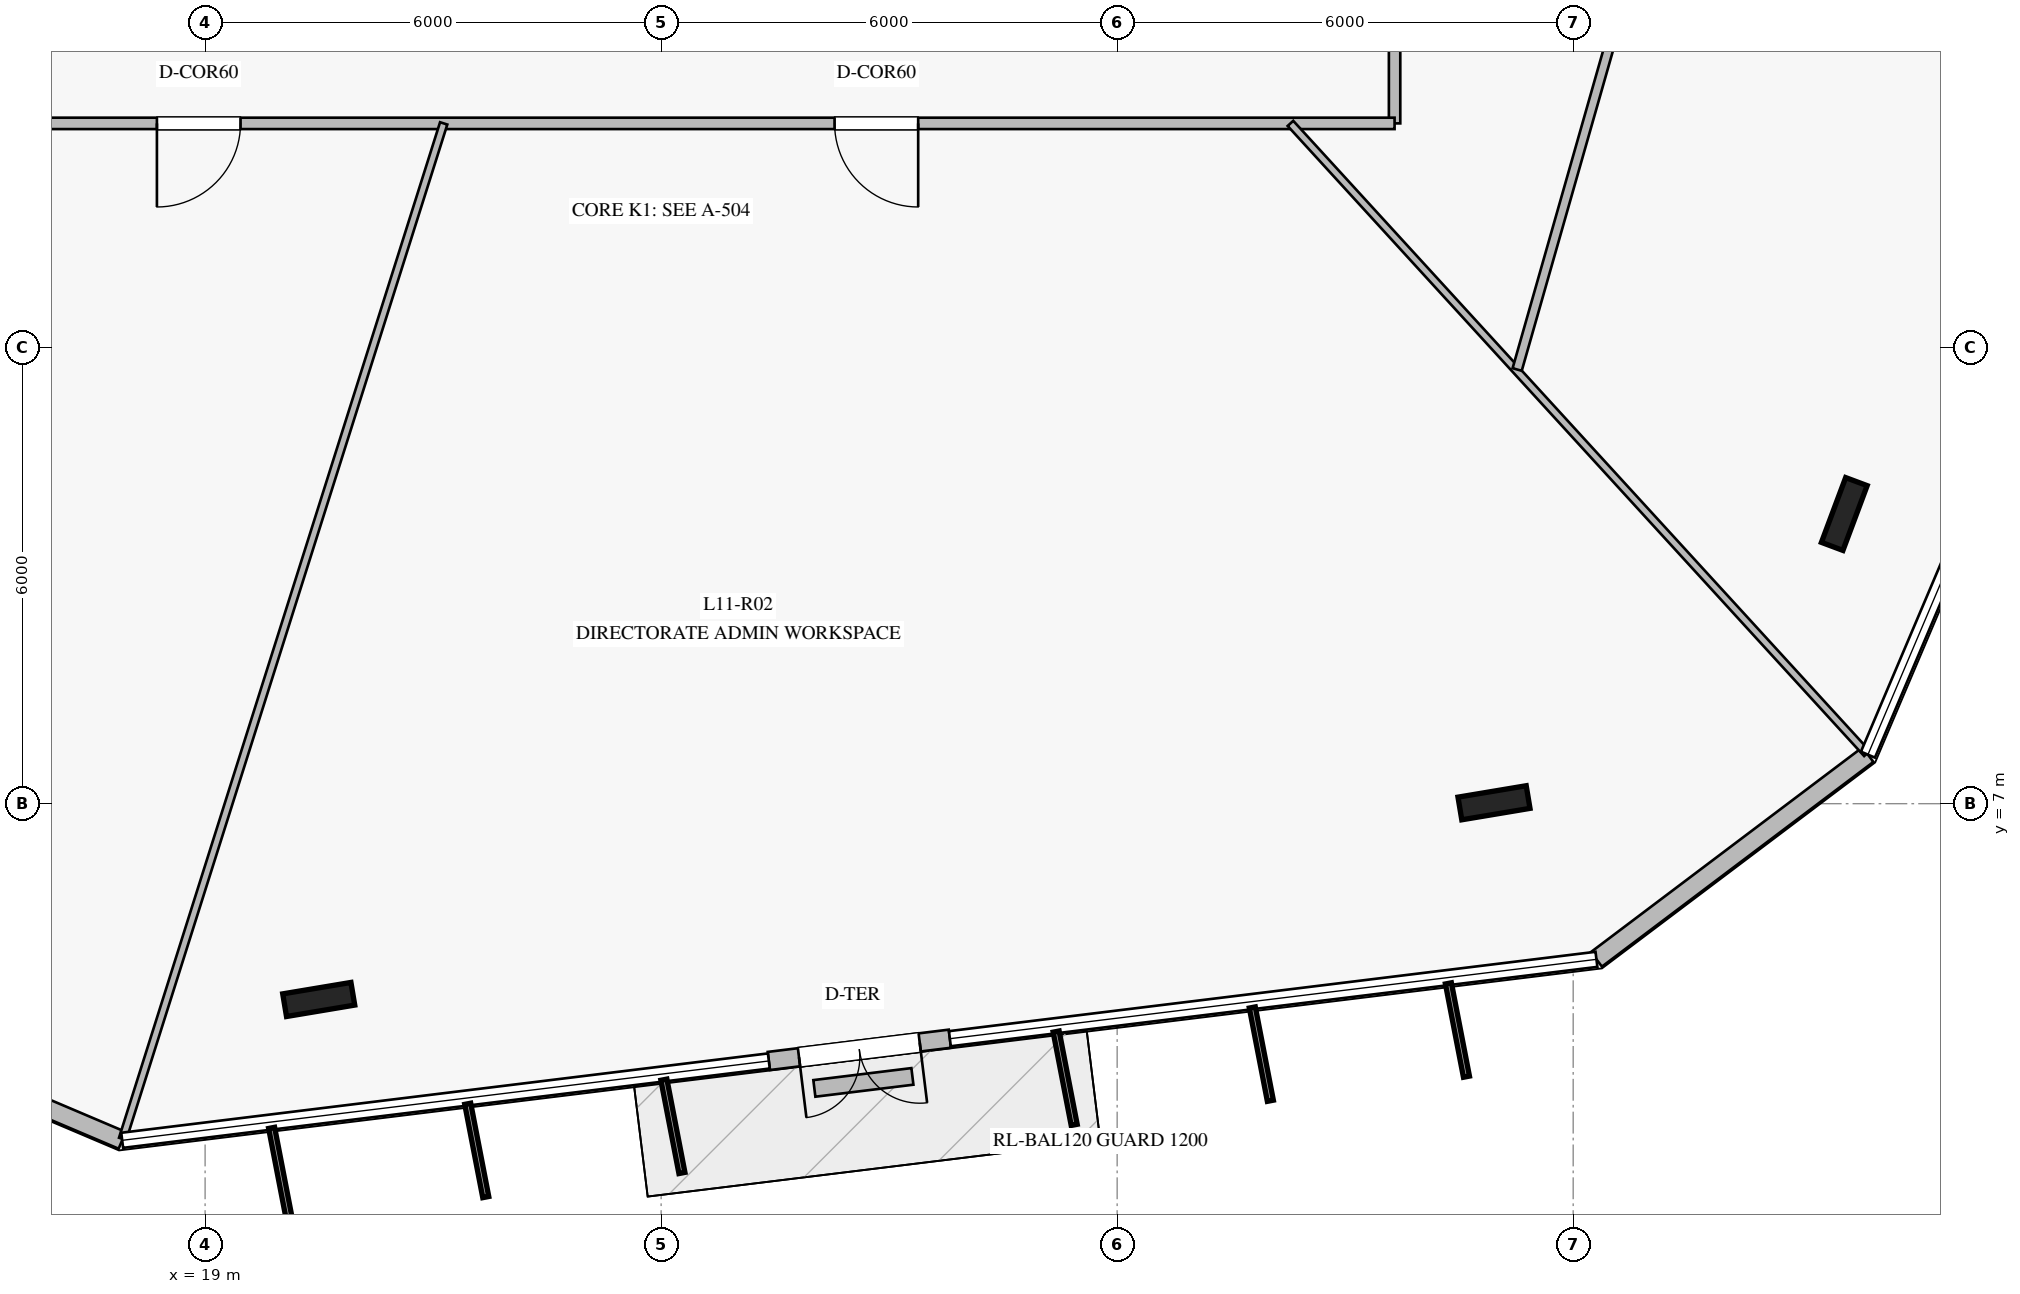
"""IFC4 building model, lengths in metres.
Left out: names, types, materials, properties, quantities, classifications, styles, units other than length and angle.
Written with IfcOpenShell. Run it as: python <this file> out.ifc"""

import sys

from ifc_helpers import new_model, si_unit, direction, frame, frame_2d, origin, origin_2d, place, context, subcontext, project, spatial, rectangle, i_section, extrude, element, fill, save


model = new_model("IFC4")
c1 = context("Model", 3, precision=1e-05, world=origin(), true_north=direction((0.0, 1.0)))
c2 = subcontext(c1, "Body", "Model", "MODEL_VIEW")
j1 = project(units=[si_unit("LENGTHUNIT", "METRE"), si_unit("PLANEANGLEUNIT", "RADIAN")], contexts=[c1])
p1 = place(None, origin())
s1 = spatial("IfcSite", under=j1, at=p1, CompositionType="ELEMENT")
p2 = place(p1, origin())
s2 = spatial("IfcBuilding", under=s1, at=p2, CompositionType="ELEMENT")
p3 = place(p2, frame((0.0, 0.0, 48.0)))
s3 = spatial("IfcBuildingStorey", under=s2, at=p3, CompositionType="ELEMENT", Elevation=48.0)
for number, where, z_axis, x_axis in (
    (1, (20.495, 4.424, 0.0), (0.0, 0.0, 1.0), (0.986, 0.165, 0.0)),
    (2, (35.958, 7.012, 0.0), (0.0, 0.0, 1.0), (0.986, 0.165, 0.0)),
    (3, (40.567, 10.811, 0.0), (0.0, 0.0, 1.0), (0.35, 0.937, 0.0)),
):
    element("IfcColumn", number, at=place(p3, frame(where, z_axis=z_axis, x_axis=x_axis)), inside=s3, PredefinedType="COLUMN", context=c2, shape_type="SweptSolid", body=[
        extrude(i_section(OverallWidth=0.302, OverallDepth=0.91, WebThickness=0.021, FlangeThickness=0.04, at=origin_2d()), origin(), (0.0, 0.0, 1.0), 4.0),
    ])
p4 = place(p3, frame((13.792, 4.319, 0.0), z_axis=(0.0, 0.0, 1.0), x_axis=(0.920463989724, -0.390827383409, 0.0)))
e4 = element("IfcWall", 4, at=p4, inside=s3, PredefinedType="STANDARD", context=c2, shape_type="SweptSolid", body=[
    extrude(rectangle(XDim=4.473, YDim=0.24, at=frame_2d((2.236, 0.0))), origin(), (0.0, 0.0, 1.0), 3.76),
])
p5 = place(p3, frame((26.417, 3.615, 0.0), z_axis=(0.0, 0.0, 1.0), x_axis=(0.992521632568, 0.122068869435, 0.0)))
e5 = element("IfcWall", 5, at=p5, inside=s3, PredefinedType="STANDARD", context=c2, shape_type="SweptSolid", body=[
    extrude(rectangle(XDim=2.4, YDim=0.24, at=frame_2d((1.2, 0.0))), origin(), (0.0, 0.0, 1.0), 3.76),
])
p6 = place(p5, frame((0.4, 0.0, 0.0)))
e6 = element("IfcOpeningElement", 6, at=p6, cuts=e5, PredefinedType="OPENING", context=c2, shape_type="SweptSolid", body=[
    extrude(rectangle(XDim=1.6, YDim=2.25, at=frame_2d((0.8, 1.125))), frame((0.0, 0.13, 0.0), z_axis=(0.0, -1.0, 0.0), x_axis=(1.0, 0.0, 0.0)), (0.0, 0.0, 1.0), 0.26),
])
p7 = place(p3, frame((37.306, 4.952, 0.0), z_axis=(0.0, 0.0, 1.0), x_axis=(0.798484642233, 0.602015179309, 0.0)))
e7 = element("IfcWall", 7, at=p7, inside=s3, PredefinedType="STANDARD", context=c2, shape_type="SweptSolid", body=[
    extrude(rectangle(XDim=4.473, YDim=0.24, at=frame_2d((2.237, 0.0))), origin(), (0.0, 0.0, 1.0), 3.76),
])
p8 = place(p3, frame((27.016, 3.254, 0.0), z_axis=(0.0, 0.0, 1.0), x_axis=(0.99256138924, 0.121745178919, 0.0)))
e8 = element("IfcWall", 8, at=p8, inside=s3, PredefinedType="USERDEFINED", context=c2, shape_type="SweptSolid", body=[
    extrude(rectangle(XDim=1.3, YDim=0.22, at=frame_2d((0.65, 0.0))), origin(), (0.0, 0.0, 1.0), 0.4),
])
p9 = place(p3, frame((34.65, 34.05, 0.0), z_axis=(0.0, 0.0, 1.0), x_axis=(0.0, -1.0, 0.0)))
e9 = element("IfcWall", 9, at=p9, inside=s3, PredefinedType="PARTITIONING", context=c2, shape_type="SweptSolid", body=[
    extrude(rectangle(XDim=18.1, YDim=0.15, at=frame_2d((9.05, 0.0))), origin(), (0.0, 0.0, 1.0), 3.21),
])
p10 = place(p9, frame((12.71, 0.0, 0.0)))
e10 = element("IfcOpeningElement", 10, at=p10, cuts=e9, PredefinedType="OPENING", context=c2, shape_type="SweptSolid", body=[
    extrude(rectangle(XDim=1.1, YDim=2.2, at=frame_2d((0.55, 1.1))), frame((0.0, 0.085, 0.0), z_axis=(0.0, -1.0, 0.0), x_axis=(1.0, 0.0, 0.0)), (0.0, 0.0, 1.0), 0.17),
])
p11 = place(p9, frame((4.117, 0.0, 0.0)))
e11 = element("IfcOpeningElement", 11, at=p11, cuts=e9, PredefinedType="OPENING", context=c2, shape_type="SweptSolid", body=[
    extrude(rectangle(XDim=1.1, YDim=2.2, at=frame_2d((0.55, 1.1))), frame((0.0, 0.085, 0.0), z_axis=(0.0, -1.0, 0.0), x_axis=(1.0, 0.0, 0.0)), (0.0, 0.0, 1.0), 0.17),
])
p12 = place(p3, frame((34.65, 15.95, 0.0), z_axis=(0.0, 0.0, 1.0), x_axis=(-1.0, 0.0, 0.0)))
e12 = element("IfcWall", 12, at=p12, inside=s3, PredefinedType="PARTITIONING", context=c2, shape_type="SweptSolid", body=[
    extrude(rectangle(XDim=19.3, YDim=0.15, at=frame_2d((9.65, 0.0))), origin(), (0.0, 0.0, 1.0), 3.21),
])
p13 = place(p12, frame((15.184, 0.0, 0.0)))
e13 = element("IfcOpeningElement", 13, at=p13, cuts=e12, PredefinedType="OPENING", context=c2, shape_type="SweptSolid", body=[
    extrude(rectangle(XDim=1.1, YDim=2.2, at=frame_2d((0.55, 1.1))), frame((0.0, 0.085, 0.0), z_axis=(0.0, -1.0, 0.0), x_axis=(1.0, 0.0, 0.0)), (0.0, 0.0, 1.0), 0.17),
])
p14 = place(p12, frame((6.268, 0.0, 0.0)))
e14 = element("IfcOpeningElement", 14, at=p14, cuts=e12, PredefinedType="OPENING", context=c2, shape_type="SweptSolid", body=[
    extrude(rectangle(XDim=1.1, YDim=2.2, at=frame_2d((0.55, 1.1))), frame((0.0, 0.085, 0.0), z_axis=(0.0, -1.0, 0.0), x_axis=(1.0, 0.0, 0.0)), (0.0, 0.0, 1.0), 0.17),
])
p15 = place(p3, frame((22.139, 15.95, 0.0), z_axis=(0.0, 0.0, 1.0), x_axis=(-0.301454069298, -0.953480699387, 0.0)))
e15 = element("IfcWall", 15, at=p15, inside=s3, PredefinedType="MOVABLE", context=c2, shape_type="SweptSolid", body=[
    extrude(rectangle(XDim=14.012, YDim=0.1, at=frame_2d((7.006, 0.0))), origin(), (0.0, 0.0, 1.0), 3.05),
])
p16 = place(p3, frame((33.28, 15.95, 0.0), z_axis=(0.0, 0.0, 1.0), x_axis=(0.675035607083, -0.737785151091, 0.0)))
e16 = element("IfcWall", 16, at=p16, inside=s3, PredefinedType="MOVABLE", context=c2, shape_type="SweptSolid", body=[
    extrude(rectangle(XDim=11.236, YDim=0.1, at=frame_2d((5.618, 0.0))), origin(), (0.0, 0.0, 1.0), 3.06),
])
p17 = place(p3, frame((36.263, 12.712, 0.0), z_axis=(0.0, 0.0, 1.0), x_axis=(0.27415099994, 0.961686658549, 0.0)))
e17 = element("IfcWall", 17, at=p17, inside=s3, PredefinedType="PARTITIONING", context=c2, shape_type="SweptSolid", body=[
    extrude(rectangle(XDim=13.179, YDim=0.125, at=frame_2d((6.589, 0.0))), origin(), (0.0, 0.0, 1.0), 3.21),
])
p18 = place(p17, frame((6.089, 0.0, 0.0)))
e18 = element("IfcOpeningElement", 18, at=p18, cuts=e17, PredefinedType="OPENING", context=c2, shape_type="SweptSolid", body=[
    extrude(rectangle(XDim=1.0, YDim=2.15, at=frame_2d((0.5, 1.075))), frame((0.0, 0.073, 0.0), z_axis=(0.0, -1.0, 0.0), x_axis=(1.0, 0.0, 0.0)), (0.0, 0.0, 1.0), 0.145),
])
p19 = place(p6, frame((1.6, 0.0, 0.0), z_axis=(0.0, 0.0, 1.0), x_axis=(-1.0, 0.0, 0.0)))
e19 = element("IfcDoor", 19, at=p19, inside=s3, OperationType="DOUBLE_DOOR_SINGLE_SWING", PredefinedType="DOOR", context=c2, shape_type="SweptSolid", body=[
    extrude(rectangle(XDim=1.6, YDim=2.25, at=frame_2d((0.8, 1.125))), frame((0.0, 0.025, 0.0), z_axis=(0.0, -1.0, 0.0), x_axis=(1.0, 0.0, 0.0)), (0.0, 0.0, 1.0), 0.05),
])
fill(e6, e19)
p20 = place(p13, origin())
e20 = element("IfcDoor", 20, at=p20, inside=s3, OperationType="SINGLE_SWING_RIGHT", PredefinedType="DOOR", context=c2, shape_type="SweptSolid", body=[
    extrude(rectangle(XDim=1.1, YDim=2.2, at=frame_2d((0.55, 1.1))), frame((0.0, 0.025, 0.0), z_axis=(0.0, -1.0, 0.0), x_axis=(1.0, 0.0, 0.0)), (0.0, 0.0, 1.0), 0.05),
])
fill(e13, e20)
p21 = place(p14, origin())
e21 = element("IfcDoor", 21, at=p21, inside=s3, OperationType="SINGLE_SWING_LEFT", PredefinedType="DOOR", context=c2, shape_type="SweptSolid", body=[
    extrude(rectangle(XDim=1.1, YDim=2.2, at=frame_2d((0.55, 1.1))), frame((0.0, 0.025, 0.0), z_axis=(0.0, -1.0, 0.0), x_axis=(1.0, 0.0, 0.0)), (0.0, 0.0, 1.0), 0.05),
])
fill(e14, e21)
save(model, sys.argv[1])
